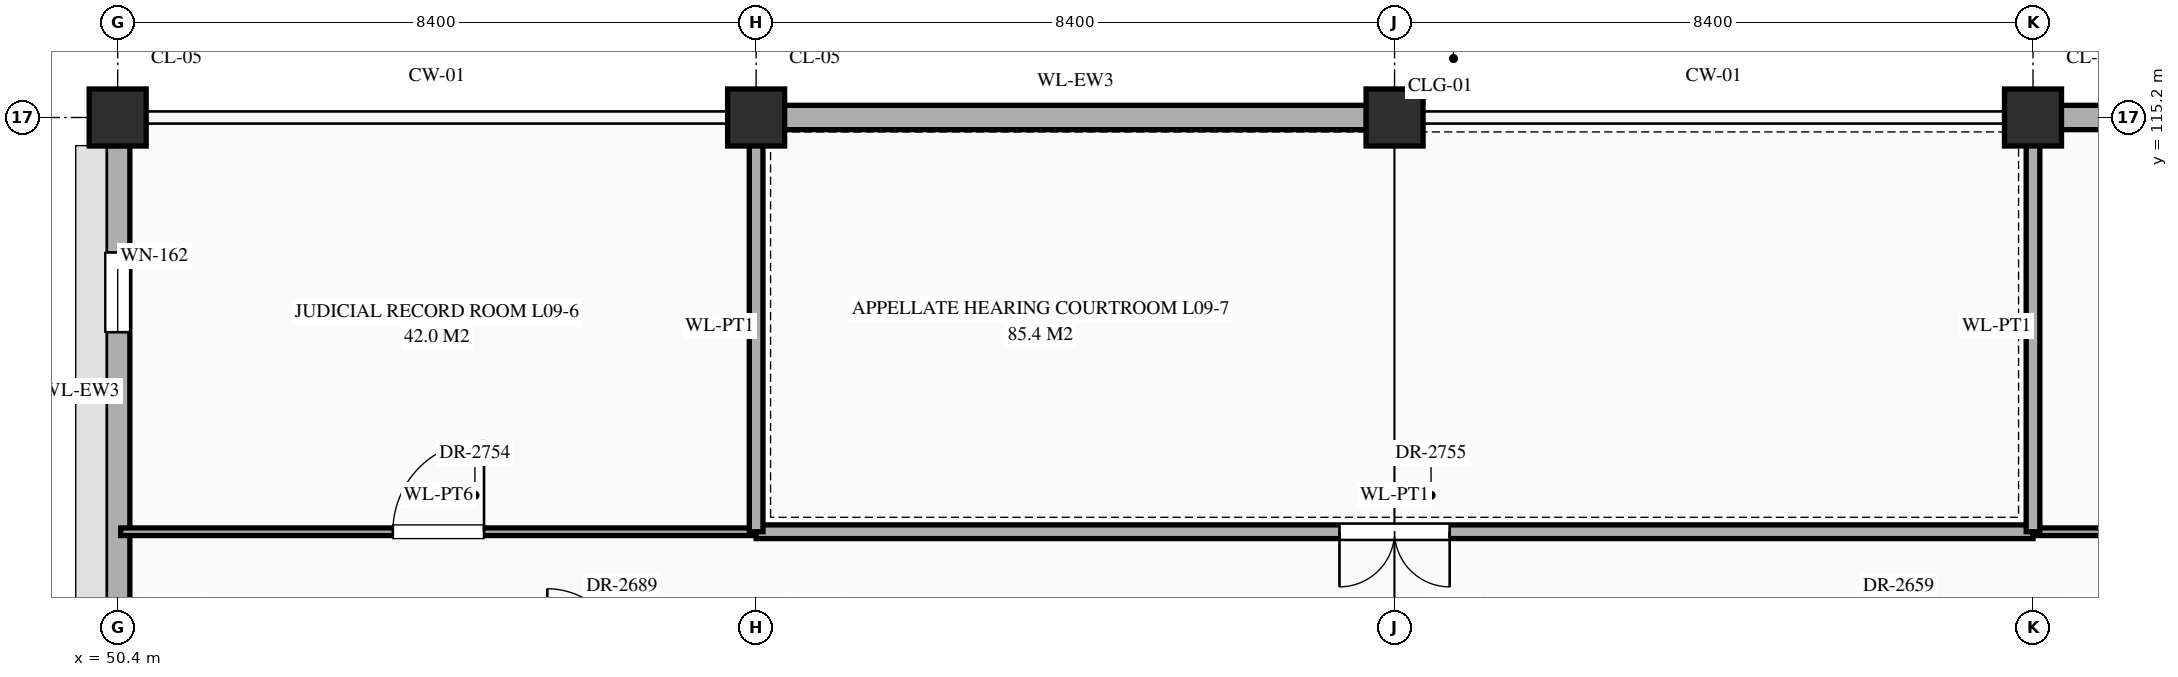
"""IFC4 building model, lengths in metres.
Left out: names, types, materials, properties, quantities, classifications, styles, units other than length and angle.
Written with IfcOpenShell. Run it as: python <this file> out.ifc"""

import sys

from ifc_helpers import new_model, si_unit, direction, frame, frame_2d, origin, origin_2d, place, context, subcontext, project, spatial, rectangle, extrude, element, fill, save


model = new_model("IFC4")
c1 = context("Model", 3, precision=1e-05, world=origin(), true_north=direction((0.0, 1.0)))
c2 = subcontext(c1, "Body", "Model", "MODEL_VIEW")
j1 = project(units=[si_unit("LENGTHUNIT", "METRE"), si_unit("PLANEANGLEUNIT", "RADIAN")], contexts=[c1])
p1 = place(None, origin())
s1 = spatial("IfcSite", under=j1, at=p1, CompositionType="ELEMENT")
p2 = place(p1, origin())
s2 = spatial("IfcBuilding", under=s1, at=p2, CompositionType="ELEMENT")
p3 = place(p2, frame((0.0, 0.0, 39.3)))
s3 = spatial("IfcBuildingStorey", under=s2, at=p3, CompositionType="ELEMENT", Elevation=39.3)
for number, where, z_axis, x_axis in (
    (1, (50.4, 115.2, 0.0), (0.0, 0.0, 1.0), (1.0, 0.0, 0.0)),
    (2, (58.8, 115.2, 0.0), (0.0, 0.0, 1.0), (1.0, 0.0, 0.0)),
    (3, (67.2, 115.2, 0.0), (0.0, 0.0, 1.0), (1.0, 0.0, 0.0)),
    (4, (75.6, 115.2, 0.0), (0.0, 0.0, 1.0), (1.0, 0.0, 0.0)),
):
    element("IfcColumn", number, at=place(p3, frame(where, z_axis=z_axis, x_axis=x_axis)), inside=s3, PredefinedType="COLUMN", context=c2, shape_type="SweptSolid", body=[
        extrude(rectangle(XDim=0.75, YDim=0.75, at=origin_2d()), origin(), (0.0, 0.0, 1.0), 4.2),
    ])
p4 = place(p3, frame((50.4, 108.37, 0.0), z_axis=(0.0, 0.0, 1.0), x_axis=(0.0, 1.0, 0.0)))
e5 = element("IfcWall", 5, at=p4, inside=s3, PredefinedType="STANDARD", context=c2, shape_type="SweptSolid", body=[
    extrude(rectangle(XDim=6.46, YDim=0.32, at=frame_2d((3.23, 0.0))), origin(), (0.0, 0.0, 1.0), 3.3),
])
p5 = place(p4, frame((4.005, 0.0, 0.85)))
e6 = element("IfcOpeningElement", 6, at=p5, cuts=e5, PredefinedType="OPENING", context=c2, shape_type="SweptSolid", body=[
    extrude(rectangle(XDim=1.05, YDim=1.92, at=frame_2d((0.525, 0.96))), frame((0.0, 0.172, 0.0), z_axis=(0.0, -1.0, 0.0), x_axis=(1.0, 0.0, 0.0)), (0.0, 0.0, 1.0), 0.344),
])
p6 = place(p3, frame((59.17, 115.2, 0.0), z_axis=(0.0, 0.0, 1.0), x_axis=(1.0, 0.0, 0.0)))
e7 = element("IfcWall", 7, at=p6, inside=s3, PredefinedType="STANDARD", context=c2, shape_type="SweptSolid", body=[
    extrude(rectangle(XDim=7.66, YDim=0.32, at=frame_2d((3.83, 0.0))), origin(), (0.0, 0.0, 1.0), 3.3),
])
p7 = place(p3, frame((75.97, 115.2, 0.0), z_axis=(0.0, 0.0, 1.0), x_axis=(1.0, 0.0, 0.0)))
e8 = element("IfcWall", 8, at=p7, inside=s3, PredefinedType="STANDARD", context=c2, shape_type="SweptSolid", body=[
    extrude(rectangle(XDim=7.66, YDim=0.32, at=frame_2d((3.83, 0.0))), origin(), (0.0, 0.0, 1.0), 3.3),
])
p8 = place(p7, frame((3.055, 0.0, 0.85)))
e9 = element("IfcOpeningElement", 9, at=p8, cuts=e8, PredefinedType="OPENING", context=c2, shape_type="SweptSolid", body=[
    extrude(rectangle(XDim=1.55, YDim=1.38, at=frame_2d((0.775, 0.69))), frame((0.0, 0.172, 0.0), z_axis=(0.0, -1.0, 0.0), x_axis=(1.0, 0.0, 0.0)), (0.0, 0.0, 1.0), 0.344),
])
p9 = place(p3, frame((50.44, 109.75, 0.0), z_axis=(0.0, 0.0, 1.0), x_axis=(1.0, 0.0, 0.0)))
e10 = element("IfcWall", 10, at=p9, inside=s3, PredefinedType="STANDARD", context=c2, shape_type="SweptSolid", body=[
    extrude(rectangle(XDim=8.36, YDim=0.1, at=frame_2d((4.18, 0.0))), origin(), (0.0, 0.0, 1.0), 3.95),
])
p10 = place(p9, frame((3.58, 0.0, 0.0)))
e11 = element("IfcOpeningElement", 11, at=p10, cuts=e10, PredefinedType="OPENING", context=c2, shape_type="SweptSolid", body=[
    extrude(rectangle(XDim=1.2, YDim=2.35, at=frame_2d((0.6, 1.175))), frame((0.0, 0.062, 0.0), z_axis=(0.0, -1.0, 0.0), x_axis=(1.0, 0.0, 0.0)), (0.0, 0.0, 1.0), 0.124),
])
p11 = place(p3, frame((58.8, 109.75, 0.0), z_axis=(0.0, 0.0, 1.0), x_axis=(1.0, 0.0, 0.0)))
e12 = element("IfcWall", 12, at=p11, inside=s3, PredefinedType="STANDARD", context=c2, shape_type="SweptSolid", body=[
    extrude(rectangle(XDim=16.8, YDim=0.18, at=frame_2d((8.4, 0.0))), origin(), (0.0, 0.0, 1.0), 3.95),
])
p12 = place(p11, frame((7.675, 0.0, 0.0)))
e13 = element("IfcOpeningElement", 13, at=p12, cuts=e12, PredefinedType="OPENING", context=c2, shape_type="SweptSolid", body=[
    extrude(rectangle(XDim=1.45, YDim=2.3, at=frame_2d((0.725, 1.15))), frame((0.0, 0.102, 0.0), z_axis=(0.0, -1.0, 0.0), x_axis=(1.0, 0.0, 0.0)), (0.0, 0.0, 1.0), 0.204),
])
p13 = place(p3, frame((75.6, 109.75, 0.0), z_axis=(0.0, 0.0, 1.0), x_axis=(1.0, 0.0, 0.0)))
e14 = element("IfcWall", 14, at=p13, inside=s3, PredefinedType="STANDARD", context=c2, shape_type="SweptSolid", body=[
    extrude(rectangle(XDim=16.8, YDim=0.1, at=frame_2d((8.4, 0.0))), origin(), (0.0, 0.0, 1.0), 3.95),
])
p14 = place(p13, frame((3.56, 0.0, 0.0)))
e15 = element("IfcOpeningElement", 15, at=p14, cuts=e14, PredefinedType="OPENING", context=c2, shape_type="SweptSolid", body=[
    extrude(rectangle(XDim=1.28, YDim=2.35, at=frame_2d((0.64, 1.175))), frame((0.0, 0.062, 0.0), z_axis=(0.0, -1.0, 0.0), x_axis=(1.0, 0.0, 0.0)), (0.0, 0.0, 1.0), 0.124),
])
p15 = place(p13, frame((12.13, 0.0, 0.0)))
e16 = element("IfcOpeningElement", 16, at=p15, cuts=e14, PredefinedType="OPENING", context=c2, shape_type="SweptSolid", body=[
    extrude(rectangle(XDim=0.94, YDim=2.3, at=frame_2d((0.47, 1.15))), frame((0.0, 0.062, 0.0), z_axis=(0.0, -1.0, 0.0), x_axis=(1.0, 0.0, 0.0)), (0.0, 0.0, 1.0), 0.124),
])
for number, where, z_axis, x_axis in (
    (17, (58.8, 109.75, 0.0), (0.0, 0.0, 1.0), (0.0, 1.0, 0.0)),
    (18, (75.6, 109.75, 0.0), (0.0, 0.0, 1.0), (0.0, 1.0, 0.0)),
):
    element("IfcWall", number, at=place(p3, frame(where, z_axis=z_axis, x_axis=x_axis)), inside=s3, PredefinedType="STANDARD", context=c2, shape_type="SweptSolid", body=[
        extrude(rectangle(XDim=5.41, YDim=0.18, at=frame_2d((2.705, 0.0))), origin(), (0.0, 0.0, 1.0), 3.2),
    ])
p16 = place(p5, origin())
e19 = element("IfcWindow", 19, at=p16, inside=s3, PartitioningType="SINGLE_PANEL", PredefinedType="WINDOW", context=c2, shape_type="SweptSolid", body=[
    extrude(rectangle(XDim=1.05, YDim=1.92, at=frame_2d((0.525, 0.96))), frame((0.0, 0.03, 0.0), z_axis=(0.0, -1.0, 0.0), x_axis=(1.0, 0.0, 0.0)), (0.0, 0.0, 1.0), 0.06),
])
fill(e6, e19)
p17 = place(p10, origin())
e20 = element("IfcDoor", 20, at=p17, inside=s3, OperationType="SINGLE_SWING_RIGHT", PredefinedType="DOOR", context=c2, shape_type="SweptSolid", body=[
    extrude(rectangle(XDim=1.2, YDim=2.35, at=frame_2d((0.6, 1.175))), frame((0.0, 0.025, 0.0), z_axis=(0.0, -1.0, 0.0), x_axis=(1.0, 0.0, 0.0)), (0.0, 0.0, 1.0), 0.05),
])
fill(e11, e20)
p18 = place(p12, frame((1.45, 0.0, 0.0), z_axis=(0.0, 0.0, 1.0), x_axis=(-1.0, 0.0, 0.0)))
e21 = element("IfcDoor", 21, at=p18, inside=s3, OperationType="DOUBLE_DOOR_SINGLE_SWING", PredefinedType="DOOR", context=c2, shape_type="SweptSolid", body=[
    extrude(rectangle(XDim=1.45, YDim=2.3, at=frame_2d((0.725, 1.15))), frame((0.0, 0.025, 0.0), z_axis=(0.0, -1.0, 0.0), x_axis=(1.0, 0.0, 0.0)), (0.0, 0.0, 1.0), 0.05),
])
fill(e13, e21)
save(model, sys.argv[1])
